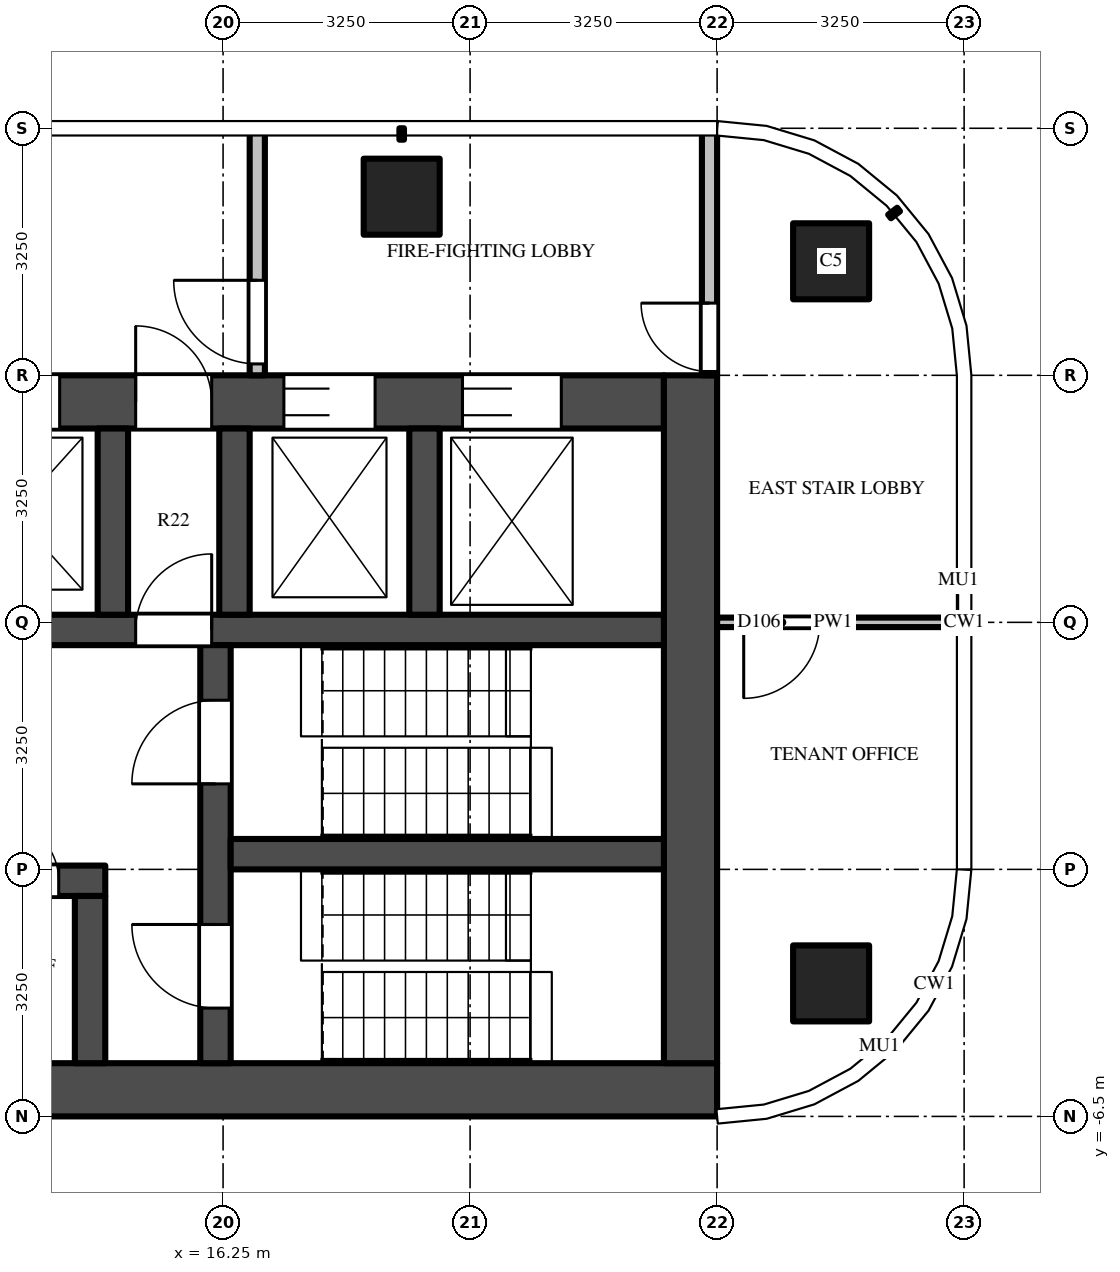
"""IFC4 building model, lengths in metres.
Left out: names, types, materials, properties, quantities, classifications, styles, units other than length and angle.
Written with IfcOpenShell. Run it as: python <this file> out.ifc"""

import sys

from ifc_helpers import new_model, si_unit, direction, frame, frame_2d, origin, origin_2d, place, context, subcontext, project, spatial, rectangle, extrude, source, transform, mapped, element, fill, save


model = new_model("IFC4")
c1 = context("Model", 3, precision=1e-05, world=origin(), true_north=direction((0.0, 1.0)))
c2 = subcontext(c1, "Body", "Model", "MODEL_VIEW")
j1 = project(units=[si_unit("LENGTHUNIT", "METRE"), si_unit("PLANEANGLEUNIT", "RADIAN")], contexts=[c1])
p1 = place(None, origin())
s1 = spatial("IfcSite", under=j1, at=p1, CompositionType="ELEMENT")
p2 = place(p1, origin())
s2 = spatial("IfcBuilding", under=s1, at=p2, CompositionType="ELEMENT")
p3 = place(p2, frame((0.0, 0.0, 318.4)))
s3 = spatial("IfcBuildingStorey", under=s2, at=p3, CompositionType="ELEMENT", Elevation=318.4)
m1 = source(origin(), c2, "Body", "SweptSolid", [
    extrude(rectangle(XDim=1.0, YDim=1.0, at=origin_2d()), origin(), (0.0, 0.0, 1.0), 3.9),
])
for number, where, z_axis, x_axis in (
    (1, (18.6, 5.6, 0.0), (0.0, 0.0, 1.0), (1.0, 0.0, 0.0)),
    (2, (24.25, 4.75, 0.0), (0.0, 0.0, 1.0), (1.0, 0.0, 0.0)),
    (3, (24.25, -4.75, 0.0), (0.0, 0.0, 1.0), (1.0, 0.0, 0.0)),
):
    element("IfcColumn", number, at=place(p3, frame(where, z_axis=z_axis, x_axis=x_axis)), inside=s3, PredefinedType="COLUMN", context=c2, shape_type="MappedRepresentation", body=[
        mapped(m1, transform((0.0, 0.0, 0.0))),
    ])
m2 = source(origin(), c2, "Body", "SweptSolid", [
    extrude(rectangle(XDim=16.65, YDim=0.7, at=frame_2d((8.325, 0.0))), origin(), (0.0, 0.0, 1.0), 3.7),
])
p4 = place(p3, frame((6.1, -6.15, 0.0), z_axis=(0.0, 0.0, 1.0), x_axis=(1.0, 0.0, 0.0)))
e4 = element("IfcWall", 4, at=p4, inside=s3, PredefinedType="SHEAR", context=c2, shape_type="MappedRepresentation", body=[
    mapped(m2, transform((0.0, 0.0, 0.0))),
])
m3 = source(origin(), c2, "Body", "SweptSolid", [
    extrude(rectangle(XDim=14.85, YDim=0.7, at=frame_2d((7.425, 0.0))), origin(), (0.0, 0.0, 1.0), 3.7),
])
p5 = place(p3, frame((7.2, 2.9, 0.0), z_axis=(0.0, 0.0, 1.0), x_axis=(1.0, 0.0, 0.0)))
e5 = element("IfcWall", 5, at=p5, inside=s3, PredefinedType="SHEAR", context=c2, shape_type="MappedRepresentation", body=[
    mapped(m3, transform((0.0, 0.0, 0.0))),
])
m4 = source(origin(), c2, "Body", "SweptSolid", [
    extrude(rectangle(XDim=1.2, YDim=2.1, at=frame_2d((0.6, 1.05))), frame((0.0, 0.36, 0.0), z_axis=(0.0, -1.0, 0.0), x_axis=(1.0, 0.0, 0.0)), (0.0, 0.0, 1.0), 0.72),
])
p6 = place(p5, frame((5.7, 0.0, 0.0)))
e6 = element("IfcOpeningElement", 6, at=p6, cuts=e5, PredefinedType="OPENING", context=c2, shape_type="MappedRepresentation", body=[
    mapped(m4, transform((0.0, 0.0, 0.0))),
])
m5 = source(origin(), c2, "Body", "SweptSolid", [
    extrude(rectangle(XDim=1.3, YDim=2.1, at=frame_2d((0.65, 1.05))), frame((0.0, 0.36, 0.0), z_axis=(0.0, -1.0, 0.0), x_axis=(1.0, 0.0, 0.0)), (0.0, 0.0, 1.0), 0.72),
])
p7 = place(p5, frame((12.2, 0.0, 0.0)))
e7 = element("IfcOpeningElement", 7, at=p7, cuts=e5, PredefinedType="OPENING", context=c2, shape_type="MappedRepresentation", body=[
    mapped(m5, transform((0.0, 0.0, 0.0))),
])
p8 = place(p5, frame((9.85, 0.0, 0.0)))
e8 = element("IfcOpeningElement", 8, at=p8, cuts=e5, PredefinedType="OPENING", context=c2, shape_type="MappedRepresentation", body=[
    mapped(m4, transform((0.0, 0.0, 0.0))),
])
m6 = source(origin(), c2, "Body", "SweptSolid", [
    extrude(rectangle(XDim=1.0, YDim=2.1, at=frame_2d((0.5, 1.05))), frame((0.0, 0.36, 0.0), z_axis=(0.0, -1.0, 0.0), x_axis=(1.0, 0.0, 0.0)), (0.0, 0.0, 1.0), 0.72),
])
p9 = place(p5, frame((7.9, 0.0, 0.0)))
e9 = element("IfcOpeningElement", 9, at=p9, cuts=e5, PredefinedType="OPENING", context=c2, shape_type="MappedRepresentation", body=[
    mapped(m6, transform((0.0, 0.0, 0.0))),
])
p10 = place(p5, frame((1.262, 0.0, 0.0)))
e10 = element("IfcOpeningElement", 10, at=p10, cuts=e5, PredefinedType="OPENING", context=c2, shape_type="MappedRepresentation", body=[
    mapped(m6, transform((0.0, 0.0, 0.0))),
])
m7 = source(origin(), c2, "Body", "SweptSolid", [
    extrude(rectangle(XDim=0.8, YDim=2.1, at=frame_2d((0.4, 1.05))), frame((0.0, 0.36, 0.0), z_axis=(0.0, -1.0, 0.0), x_axis=(1.0, 0.0, 0.0)), (0.0, 0.0, 1.0), 0.72),
])
p11 = place(p5, frame((3.837, 0.0, 0.0)))
e11 = element("IfcOpeningElement", 11, at=p11, cuts=e5, PredefinedType="OPENING", context=c2, shape_type="MappedRepresentation", body=[
    mapped(m7, transform((0.0, 0.0, 0.0))),
])
m8 = source(origin(), c2, "Body", "SweptSolid", [
    extrude(rectangle(XDim=9.05, YDim=0.7, at=frame_2d((4.525, 0.0))), origin(), (0.0, 0.0, 1.0), 3.7),
])
p12 = place(p3, frame((22.4, -5.8, 0.0), z_axis=(0.0, 0.0, 1.0), x_axis=(0.0, 1.0, 0.0)))
e12 = element("IfcWall", 12, at=p12, inside=s3, PredefinedType="SHEAR", context=c2, shape_type="MappedRepresentation", body=[
    mapped(m8, transform((0.0, 0.0, 0.0))),
])
m9 = source(origin(), c2, "Body", "SweptSolid", [
    extrude(rectangle(XDim=7.5, YDim=0.4, at=frame_2d((3.75, 0.0))), origin(), (0.0, 0.0, 1.0), 3.7),
])
p13 = place(p3, frame((7.2, -3.4, 0.0), z_axis=(0.0, 0.0, 1.0), x_axis=(1.0, 0.0, 0.0)))
e13 = element("IfcWall", 13, at=p13, inside=s3, PredefinedType="SHEAR", context=c2, shape_type="MappedRepresentation", body=[
    mapped(m9, transform((0.0, 0.0, 0.0))),
])
m10 = source(origin(), c2, "Body", "SweptSolid", [
    extrude(rectangle(XDim=0.8, YDim=2.1, at=frame_2d((0.4, 1.05))), frame((0.0, 0.21, 0.0), z_axis=(0.0, -1.0, 0.0), x_axis=(1.0, 0.0, 0.0)), (0.0, 0.0, 1.0), 0.42),
])
p14 = place(p13, frame((0.212, 0.0, 0.0)))
e14 = element("IfcOpeningElement", 14, at=p14, cuts=e13, PredefinedType="OPENING", context=c2, shape_type="MappedRepresentation", body=[
    mapped(m10, transform((0.0, 0.0, 0.0))),
])
m11 = source(origin(), c2, "Body", "SweptSolid", [
    extrude(rectangle(XDim=1.0, YDim=2.1, at=frame_2d((0.5, 1.05))), frame((0.0, 0.21, 0.0), z_axis=(0.0, -1.0, 0.0), x_axis=(1.0, 0.0, 0.0)), (0.0, 0.0, 1.0), 0.42),
])
p15 = place(p13, frame((3.05, 0.0, 0.0)))
e15 = element("IfcOpeningElement", 15, at=p15, cuts=e13, PredefinedType="OPENING", context=c2, shape_type="MappedRepresentation", body=[
    mapped(m11, transform((0.0, 0.0, 0.0))),
])
p16 = place(p13, frame((6.087, 0.0, 0.0)))
e16 = element("IfcOpeningElement", 16, at=p16, cuts=e13, PredefinedType="OPENING", context=c2, shape_type="MappedRepresentation", body=[
    mapped(m10, transform((0.0, 0.0, 0.0))),
])
m12 = source(origin(), c2, "Body", "SweptSolid", [
    extrude(rectangle(XDim=14.85, YDim=0.4, at=frame_2d((7.425, 0.0))), origin(), (0.0, 0.0, 1.0), 3.7),
])
p17 = place(p3, frame((7.2, -0.1, 0.0), z_axis=(0.0, 0.0, 1.0), x_axis=(1.0, 0.0, 0.0)))
e17 = element("IfcWall", 17, at=p17, inside=s3, PredefinedType="SHEAR", context=c2, shape_type="MappedRepresentation", body=[
    mapped(m12, transform((0.0, 0.0, 0.0))),
])
p18 = place(p17, frame((7.9, 0.0, 0.0)))
e18 = element("IfcOpeningElement", 18, at=p18, cuts=e17, PredefinedType="OPENING", context=c2, shape_type="MappedRepresentation", body=[
    mapped(m11, transform((0.0, 0.0, 0.0))),
])
m13 = source(origin(), c2, "Body", "SweptSolid", [
    extrude(rectangle(XDim=5.5, YDim=0.4, at=frame_2d((2.75, 0.0))), origin(), (0.0, 0.0, 1.0), 3.7),
])
p19 = place(p3, frame((16.15, -5.8, 0.0), z_axis=(0.0, 0.0, 1.0), x_axis=(0.0, 1.0, 0.0)))
e19 = element("IfcWall", 19, at=p19, inside=s3, PredefinedType="SHEAR", context=c2, shape_type="MappedRepresentation", body=[
    mapped(m13, transform((0.0, 0.0, 0.0))),
])
m14 = source(origin(), c2, "Body", "SweptSolid", [
    extrude(rectangle(XDim=1.1, YDim=2.1, at=frame_2d((0.55, 1.05))), frame((0.0, 0.21, 0.0), z_axis=(0.0, -1.0, 0.0), x_axis=(1.0, 0.0, 0.0)), (0.0, 0.0, 1.0), 0.42),
])
p20 = place(p19, frame((0.725, 0.0, 0.0)))
e20 = element("IfcOpeningElement", 20, at=p20, cuts=e19, PredefinedType="OPENING", context=c2, shape_type="MappedRepresentation", body=[
    mapped(m14, transform((0.0, 0.0, 0.0))),
])
p21 = place(p19, frame((3.675, 0.0, 0.0)))
e21 = element("IfcOpeningElement", 21, at=p21, cuts=e19, PredefinedType="OPENING", context=c2, shape_type="MappedRepresentation", body=[
    mapped(m14, transform((0.0, 0.0, 0.0))),
])
m15 = source(origin(), c2, "Body", "SweptSolid", [
    extrude(rectangle(XDim=5.7, YDim=0.4, at=frame_2d((2.85, 0.0))), origin(), (0.0, 0.0, 1.0), 3.7),
])
p22 = place(p3, frame((16.35, -3.05, 0.0), z_axis=(0.0, 0.0, 1.0), x_axis=(1.0, 0.0, 0.0)))
e22 = element("IfcWall", 22, at=p22, inside=s3, PredefinedType="SHEAR", context=c2, shape_type="MappedRepresentation", body=[
    mapped(m15, transform((0.0, 0.0, 0.0))),
])
m16 = source(origin(), c2, "Body", "SweptSolid", [
    extrude(rectangle(XDim=2.2, YDim=0.4, at=frame_2d((1.1, 0.0))), origin(), (0.0, 0.0, 1.0), 3.7),
])
p23 = place(p3, frame((14.5, -5.8, 0.0), z_axis=(0.0, 0.0, 1.0), x_axis=(0.0, 1.0, 0.0)))
e23 = element("IfcWall", 23, at=p23, inside=s3, PredefinedType="SHEAR", context=c2, shape_type="MappedRepresentation", body=[
    mapped(m16, transform((0.0, 0.0, 0.0))),
])
m17 = source(origin(), c2, "Body", "SweptSolid", [
    extrude(rectangle(XDim=2.45, YDim=0.4, at=frame_2d((1.225, 0.0))), origin(), (0.0, 0.0, 1.0), 3.7),
])
for number, where, z_axis, x_axis in (
    (24, (14.8, 0.1, 0.0), (0.0, 0.0, 1.0), (0.0, 1.0, 0.0)),
    (25, (16.4, 0.1, 0.0), (0.0, 0.0, 1.0), (0.0, 1.0, 0.0)),
    (26, (18.9, 0.1, 0.0), (0.0, 0.0, 1.0), (0.0, 1.0, 0.0)),
):
    element("IfcWall", number, at=place(p3, frame(where, z_axis=z_axis, x_axis=x_axis)), inside=s3, PredefinedType="SHEAR", context=c2, shape_type="MappedRepresentation", body=[
        mapped(m17, transform((0.0, 0.0, 0.0))),
    ])
m18 = source(origin(), c2, "Body", "SweptSolid", [
    extrude(rectangle(XDim=3.25, YDim=0.2, at=frame_2d((1.625, 0.0))), origin(), (0.0, 0.0, 1.0), 3.7),
])
p24 = place(p3, frame((16.7, 3.25, 0.0), z_axis=(0.0, 0.0, 1.0), x_axis=(0.0, 1.0, 0.0)))
e27 = element("IfcWall", 27, at=p24, inside=s3, PredefinedType="PARTITIONING", context=c2, shape_type="MappedRepresentation", body=[
    mapped(m18, transform((0.0, 0.0, 0.0))),
])
m19 = source(origin(), c2, "Body", "SweptSolid", [
    extrude(rectangle(XDim=1.1, YDim=2.1, at=frame_2d((0.55, 1.05))), frame((0.0, 0.11, 0.0), z_axis=(0.0, -1.0, 0.0), x_axis=(1.0, 0.0, 0.0)), (0.0, 0.0, 1.0), 0.22),
])
p25 = place(p24, frame((0.15, 0.0, 0.0)))
e28 = element("IfcOpeningElement", 28, at=p25, cuts=e27, PredefinedType="OPENING", context=c2, shape_type="MappedRepresentation", body=[
    mapped(m19, transform((0.0, 0.0, 0.0))),
])
p26 = place(p3, frame((22.65, 3.25, 0.0), z_axis=(0.0, 0.0, 1.0), x_axis=(0.0, 1.0, 0.0)))
e29 = element("IfcWall", 29, at=p26, inside=s3, PredefinedType="PARTITIONING", context=c2, shape_type="MappedRepresentation", body=[
    mapped(m18, transform((0.0, 0.0, 0.0))),
])
m20 = source(origin(), c2, "Body", "SweptSolid", [
    extrude(rectangle(XDim=0.9, YDim=2.1, at=frame_2d((0.45, 1.05))), frame((0.0, 0.11, 0.0), z_axis=(0.0, -1.0, 0.0), x_axis=(1.0, 0.0, 0.0)), (0.0, 0.0, 1.0), 0.22),
])
p27 = place(p26, frame((0.05, 0.0, 0.0)))
e30 = element("IfcOpeningElement", 30, at=p27, cuts=e29, PredefinedType="OPENING", context=c2, shape_type="MappedRepresentation", body=[
    mapped(m20, transform((0.0, 0.0, 0.0))),
])
m21 = source(origin(), c2, "Body", "SweptSolid", [
    extrude(rectangle(XDim=3.05, YDim=0.125, at=frame_2d((1.525, 0.0))), origin(), (0.0, 0.0, 1.0), 2.78),
])
p28 = place(p3, frame((25.8, 0.0, 0.0), z_axis=(0.0, 0.0, 1.0), x_axis=(-1.0, 0.0, 0.0)))
e31 = element("IfcWall", 31, at=p28, inside=s3, PredefinedType="PARTITIONING", context=c2, shape_type="MappedRepresentation", body=[
    mapped(m21, transform((0.0, 0.0, 0.0))),
])
m22 = source(origin(), c2, "Body", "SweptSolid", [
    extrude(rectangle(XDim=1.0, YDim=2.1, at=frame_2d((0.5, 1.05))), frame((0.0, 0.073, 0.0), z_axis=(0.0, -1.0, 0.0), x_axis=(1.0, 0.0, 0.0)), (0.0, 0.0, 1.0), 0.145),
])
p29 = place(p28, frame((1.7, 0.0, 0.0)))
e32 = element("IfcOpeningElement", 32, at=p29, cuts=e31, PredefinedType="OPENING", context=c2, shape_type="MappedRepresentation", body=[
    mapped(m22, transform((0.0, 0.0, 0.0))),
])
m23 = source(origin(), c2, "Body", "SweptSolid", [
    extrude(rectangle(XDim=1.2, YDim=2.1, at=frame_2d((0.6, 1.05))), frame((0.0, -0.275, 0.0), z_axis=(0.0, -1.0, 0.0), x_axis=(1.0, 0.0, 0.0)), (0.0, 0.0, 1.0), 0.05),
])
p30 = place(p6, origin())
e33 = element("IfcDoor", 33, at=p30, inside=s3, OperationType="DOUBLE_DOOR_SLIDING", PredefinedType="DOOR", context=c2, shape_type="MappedRepresentation", body=[
    mapped(m23, transform((0.0, 0.0, 0.0))),
])
fill(e6, e33)
m24 = source(origin(), c2, "Body", "SweptSolid", [
    extrude(rectangle(XDim=1.3, YDim=2.1, at=frame_2d((0.65, 1.05))), frame((0.0, -0.275, 0.0), z_axis=(0.0, -1.0, 0.0), x_axis=(1.0, 0.0, 0.0)), (0.0, 0.0, 1.0), 0.05),
])
p31 = place(p7, origin())
e34 = element("IfcDoor", 34, at=p31, inside=s3, OperationType="DOUBLE_DOOR_SLIDING", PredefinedType="DOOR", context=c2, shape_type="MappedRepresentation", body=[
    mapped(m24, transform((0.0, 0.0, 0.0))),
])
fill(e7, e34)
p32 = place(p8, origin())
e35 = element("IfcDoor", 35, at=p32, inside=s3, OperationType="DOUBLE_DOOR_SLIDING", PredefinedType="DOOR", context=c2, shape_type="MappedRepresentation", body=[
    mapped(m23, transform((0.0, 0.0, 0.0))),
])
fill(e8, e35)
m25 = source(origin(), c2, "Body", "SweptSolid", [
    extrude(rectangle(XDim=1.1, YDim=2.1, at=frame_2d((0.55, 1.05))), frame((0.0, 0.025, 0.0), z_axis=(0.0, -1.0, 0.0), x_axis=(1.0, 0.0, 0.0)), (0.0, 0.0, 1.0), 0.05),
])
p33 = place(p20, origin())
e36 = element("IfcDoor", 36, at=p33, inside=s3, OperationType="SINGLE_SWING_RIGHT", PredefinedType="DOOR", context=c2, shape_type="MappedRepresentation", body=[
    mapped(m25, transform((0.0, 0.0, 0.0))),
])
fill(e20, e36)
p34 = place(p21, origin())
e37 = element("IfcDoor", 37, at=p34, inside=s3, OperationType="SINGLE_SWING_LEFT", PredefinedType="DOOR", context=c2, shape_type="MappedRepresentation", body=[
    mapped(m25, transform((0.0, 0.0, 0.0))),
])
fill(e21, e37)
m26 = source(origin(), c2, "Body", "SweptSolid", [
    extrude(rectangle(XDim=1.0, YDim=2.1, at=frame_2d((0.5, 1.05))), frame((0.0, 0.025, 0.0), z_axis=(0.0, -1.0, 0.0), x_axis=(1.0, 0.0, 0.0)), (0.0, 0.0, 1.0), 0.05),
])
p35 = place(p18, origin())
e38 = element("IfcDoor", 38, at=p35, inside=s3, OperationType="SINGLE_SWING_RIGHT", PredefinedType="DOOR", context=c2, shape_type="MappedRepresentation", body=[
    mapped(m26, transform((0.0, 0.0, 0.0))),
])
fill(e18, e38)
m27 = source(origin(), c2, "Body", "SweptSolid", [
    extrude(rectangle(XDim=1.0, YDim=2.1, at=frame_2d((0.5, 1.05))), frame((0.0, -0.275, 0.0), z_axis=(0.0, -1.0, 0.0), x_axis=(1.0, 0.0, 0.0)), (0.0, 0.0, 1.0), 0.05),
])
p36 = place(p9, origin())
e39 = element("IfcDoor", 39, at=p36, inside=s3, OperationType="SINGLE_SWING_LEFT", PredefinedType="DOOR", context=c2, shape_type="MappedRepresentation", body=[
    mapped(m27, transform((0.0, 0.0, 0.0))),
])
fill(e9, e39)
p37 = place(p25, origin())
e40 = element("IfcDoor", 40, at=p37, inside=s3, OperationType="SINGLE_SWING_RIGHT", PredefinedType="DOOR", context=c2, shape_type="MappedRepresentation", body=[
    mapped(m25, transform((0.0, 0.0, 0.0))),
])
fill(e28, e40)
m28 = source(origin(), c2, "Body", "SweptSolid", [
    extrude(rectangle(XDim=0.9, YDim=2.1, at=frame_2d((0.45, 1.05))), frame((0.0, 0.025, 0.0), z_axis=(0.0, -1.0, 0.0), x_axis=(1.0, 0.0, 0.0)), (0.0, 0.0, 1.0), 0.05),
])
p38 = place(p27, origin())
e41 = element("IfcDoor", 41, at=p38, inside=s3, OperationType="SINGLE_SWING_RIGHT", PredefinedType="DOOR", context=c2, shape_type="MappedRepresentation", body=[
    mapped(m28, transform((0.0, 0.0, 0.0))),
])
fill(e30, e41)
m29 = source(origin(), c2, "Body", "SweptSolid", [
    extrude(rectangle(XDim=0.8, YDim=2.1, at=frame_2d((0.4, 1.05))), frame((0.0, 0.025, 0.0), z_axis=(0.0, -1.0, 0.0), x_axis=(1.0, 0.0, 0.0)), (0.0, 0.0, 1.0), 0.05),
])
p39 = place(p16, origin())
e42 = element("IfcDoor", 42, at=p39, inside=s3, OperationType="SINGLE_SWING_LEFT", PredefinedType="DOOR", context=c2, shape_type="MappedRepresentation", body=[
    mapped(m29, transform((0.0, 0.0, 0.0))),
])
fill(e16, e42)
p40 = place(p29, origin())
e43 = element("IfcDoor", 43, at=p40, inside=s3, OperationType="SINGLE_SWING_RIGHT", PredefinedType="DOOR", context=c2, shape_type="MappedRepresentation", body=[
    mapped(m26, transform((0.0, 0.0, 0.0))),
])
fill(e32, e43)
save(model, sys.argv[1])
